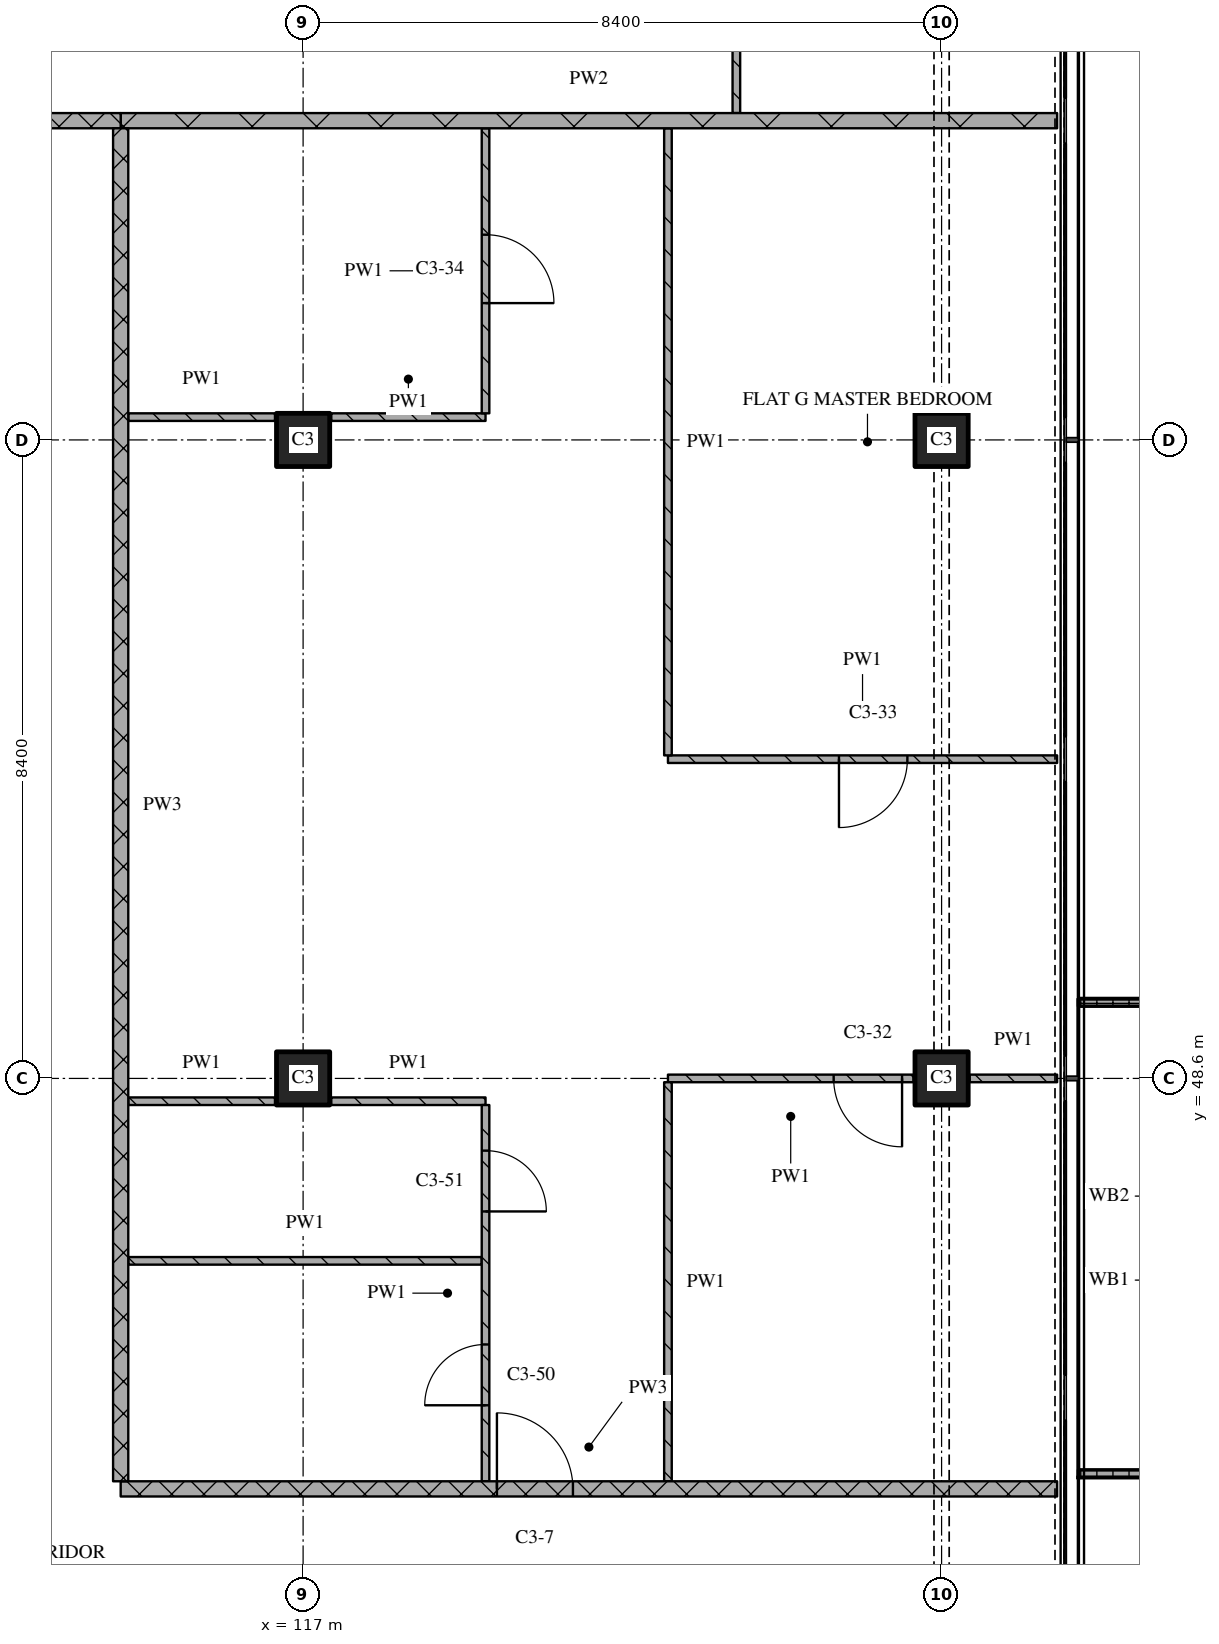
"""IFC4 building model, lengths in metres.
Left out: names, types, materials, properties, quantities, classifications, styles, units other than length and angle.
Written with IfcOpenShell. Run it as: python <this file> out.ifc"""

import sys

from ifc_helpers import new_model, si_unit, direction, frame, frame_2d, origin, origin_2d, place, context, subcontext, project, spatial, polyline, rectangle, outline, extrude, element, fill, save


model = new_model("IFC4")
c1 = context("Model", 3, precision=1e-05, world=origin(), true_north=direction((0.0, 1.0)))
c2 = subcontext(c1, "Body", "Model", "MODEL_VIEW")
j1 = project(units=[si_unit("LENGTHUNIT", "METRE"), si_unit("PLANEANGLEUNIT", "RADIAN")], contexts=[c1])
p1 = place(None, origin())
s1 = spatial("IfcSite", under=j1, at=p1, CompositionType="ELEMENT")
p2 = place(p1, origin())
s2 = spatial("IfcBuilding", under=s1, at=p2, CompositionType="ELEMENT")
p3 = place(p2, frame((0.0, 0.0, 169.05)))
s3 = spatial("IfcBuildingStorey", under=s2, at=p3, CompositionType="ELEMENT", Elevation=169.05)
for number, where, z_axis, x_axis in (
    (1, (117.0, 48.6, 0.0), (0.0, 0.0, 1.0), (1.0, 0.0, 0.0)),
    (2, (117.0, 57.0, 0.0), (0.0, 0.0, 1.0), (1.0, 0.0, 0.0)),
    (3, (125.4, 48.6, 0.0), (0.0, 0.0, 1.0), (1.0, 0.0, 0.0)),
    (4, (125.4, 57.0, 0.0), (0.0, 0.0, 1.0), (1.0, 0.0, 0.0)),
):
    element("IfcColumn", number, at=place(p3, frame(where, z_axis=z_axis, x_axis=x_axis)), inside=s3, PredefinedType="COLUMN", context=c2, shape_type="SweptSolid", body=[
        extrude(rectangle(XDim=0.7, YDim=0.7, at=origin_2d()), origin(), (0.0, 0.0, 1.0), 3.6),
    ])
p4 = place(p3, origin())
e5 = element("IfcWall", 5, at=p4, inside=s3, PredefinedType="SOLIDWALL", context=c2, shape_type="SweptSolid", body=[
    extrude(outline(polyline([(127.2, 43.35), (127.2, 43.45), (128.967, 43.45), (128.967, 49.55), (127.2, 49.55), (127.2, 49.65), (129.067, 49.65), (129.067, 43.35), (127.2, 43.35)])), origin(), (0.0, 0.0, 1.0), 1.0),
])
p5 = place(p3, frame((114.6, 43.2, 0.0), z_axis=(0.0, 0.0, 1.0), x_axis=(1.0, 0.0, 0.0)))
e6 = element("IfcWall", 6, at=p5, inside=s3, PredefinedType="PARTITIONING", context=c2, shape_type="SweptSolid", body=[
    extrude(rectangle(XDim=12.32, YDim=0.2, at=frame_2d((6.16, 0.0))), origin(), (0.0, 0.0, 1.0), 3.32),
])
p6 = place(p5, frame((4.95, 0.0, 0.0)))
e7 = element("IfcOpeningElement", 7, at=p6, cuts=e6, PredefinedType="OPENING", context=c2, shape_type="SweptSolid", body=[
    extrude(rectangle(XDim=1.0, YDim=2.1, at=frame_2d((0.5, 1.05))), frame((0.0, 0.11, 0.0), z_axis=(0.0, -1.0, 0.0), x_axis=(1.0, 0.0, 0.0)), (0.0, 0.0, 1.0), 0.22),
])
p7 = place(p3, frame((114.7, 46.2, 0.0), z_axis=(0.0, 0.0, 1.0), x_axis=(1.0, 0.0, 0.0)))
e8 = element("IfcWall", 8, at=p7, inside=s3, PredefinedType="PARTITIONING", context=c2, shape_type="SweptSolid", body=[
    extrude(rectangle(XDim=4.65, YDim=0.1, at=frame_2d((2.325, 0.0))), origin(), (0.0, 0.0, 1.0), 3.32),
])
p8 = place(p3, frame((114.7, 48.3, 0.0), z_axis=(0.0, 0.0, 1.0), x_axis=(1.0, 0.0, 0.0)))
e9 = element("IfcWall", 9, at=p8, inside=s3, PredefinedType="PARTITIONING", context=c2, shape_type="SweptSolid", body=[
    extrude(rectangle(XDim=1.93, YDim=0.1, at=frame_2d((0.965, 0.0))), origin(), (0.0, 0.0, 1.0), 3.32),
])
p9 = place(p3, frame((117.37, 48.3, 0.0), z_axis=(0.0, 0.0, 1.0), x_axis=(1.0, 0.0, 0.0)))
e10 = element("IfcWall", 10, at=p9, inside=s3, PredefinedType="PARTITIONING", context=c2, shape_type="SweptSolid", body=[
    extrude(rectangle(XDim=2.03, YDim=0.1, at=frame_2d((1.015, 0.0))), origin(), (0.0, 0.0, 1.0), 3.32),
])
p10 = place(p3, frame((125.03, 48.6, 0.0), z_axis=(0.0, 0.0, 1.0), x_axis=(-1.0, 0.0, 0.0)))
e11 = element("IfcWall", 11, at=p10, inside=s3, PredefinedType="PARTITIONING", context=c2, shape_type="SweptSolid", body=[
    extrude(rectangle(XDim=3.23, YDim=0.1, at=frame_2d((1.615, 0.0))), origin(), (0.0, 0.0, 1.0), 3.32),
])
p11 = place(p10, frame((0.15, 0.0, 0.0)))
e12 = element("IfcOpeningElement", 12, at=p11, cuts=e11, PredefinedType="OPENING", context=c2, shape_type="SweptSolid", body=[
    extrude(rectangle(XDim=0.9, YDim=2.1, at=frame_2d((0.45, 1.05))), frame((0.0, 0.06, 0.0), z_axis=(0.0, -1.0, 0.0), x_axis=(1.0, 0.0, 0.0)), (0.0, 0.0, 1.0), 0.12),
])
p12 = place(p3, frame((125.77, 48.6, 0.0), z_axis=(0.0, 0.0, 1.0), x_axis=(1.0, 0.0, 0.0)))
e13 = element("IfcWall", 13, at=p12, inside=s3, PredefinedType="PARTITIONING", context=c2, shape_type="SweptSolid", body=[
    extrude(rectangle(XDim=1.15, YDim=0.1, at=frame_2d((0.575, 0.0))), origin(), (0.0, 0.0, 1.0), 3.32),
])
p13 = place(p3, frame((121.8, 52.8, 0.0), z_axis=(0.0, 0.0, 1.0), x_axis=(1.0, 0.0, 0.0)))
e14 = element("IfcWall", 14, at=p13, inside=s3, PredefinedType="PARTITIONING", context=c2, shape_type="SweptSolid", body=[
    extrude(rectangle(XDim=5.12, YDim=0.1, at=frame_2d((2.56, 0.0))), origin(), (0.0, 0.0, 1.0), 3.32),
])
p14 = place(p13, frame((2.25, 0.0, 0.0)))
e15 = element("IfcOpeningElement", 15, at=p14, cuts=e14, PredefinedType="OPENING", context=c2, shape_type="SweptSolid", body=[
    extrude(rectangle(XDim=0.9, YDim=2.1, at=frame_2d((0.45, 1.05))), frame((0.0, 0.06, 0.0), z_axis=(0.0, -1.0, 0.0), x_axis=(1.0, 0.0, 0.0)), (0.0, 0.0, 1.0), 0.12),
])
p15 = place(p3, frame((114.7, 57.3, 0.0), z_axis=(0.0, 0.0, 1.0), x_axis=(1.0, 0.0, 0.0)))
e16 = element("IfcWall", 16, at=p15, inside=s3, PredefinedType="PARTITIONING", context=c2, shape_type="SweptSolid", body=[
    extrude(rectangle(XDim=1.93, YDim=0.1, at=frame_2d((0.965, 0.0))), origin(), (0.0, 0.0, 1.0), 3.32),
])
p16 = place(p3, frame((117.37, 57.3, 0.0), z_axis=(0.0, 0.0, 1.0), x_axis=(1.0, 0.0, 0.0)))
e17 = element("IfcWall", 17, at=p16, inside=s3, PredefinedType="PARTITIONING", context=c2, shape_type="SweptSolid", body=[
    extrude(rectangle(XDim=2.03, YDim=0.1, at=frame_2d((1.015, 0.0))), origin(), (0.0, 0.0, 1.0), 3.32),
])
p17 = place(p3, frame((111.0, 61.2, 0.0), z_axis=(0.0, 0.0, 1.0), x_axis=(1.0, 0.0, 0.0)))
e18 = element("IfcWall", 18, at=p17, inside=s3, PredefinedType="PARTITIONING", context=c2, shape_type="SweptSolid", body=[
    extrude(rectangle(XDim=3.6, YDim=0.2, at=frame_2d((1.8, 0.0))), origin(), (0.0, 0.0, 1.0), 3.32),
])
p18 = place(p3, frame((114.6, 61.2, 0.0), z_axis=(0.0, 0.0, 1.0), x_axis=(1.0, 0.0, 0.0)))
e19 = element("IfcWall", 19, at=p18, inside=s3, PredefinedType="PARTITIONING", context=c2, shape_type="SweptSolid", body=[
    extrude(rectangle(XDim=12.32, YDim=0.2, at=frame_2d((6.16, 0.0))), origin(), (0.0, 0.0, 1.0), 3.32),
])
p19 = place(p3, frame((114.6, 61.1, 0.0), z_axis=(0.0, 0.0, 1.0), x_axis=(0.0, -1.0, 0.0)))
e20 = element("IfcWall", 20, at=p19, inside=s3, PredefinedType="PARTITIONING", context=c2, shape_type="SweptSolid", body=[
    extrude(rectangle(XDim=17.8, YDim=0.2, at=frame_2d((8.9, 0.0))), origin(), (0.0, 0.0, 1.0), 3.32),
])
p20 = place(p3, frame((119.4, 43.3, 0.0), z_axis=(0.0, 0.0, 1.0), x_axis=(0.0, 1.0, 0.0)))
e21 = element("IfcWall", 21, at=p20, inside=s3, PredefinedType="PARTITIONING", context=c2, shape_type="SweptSolid", body=[
    extrude(rectangle(XDim=4.95, YDim=0.1, at=frame_2d((2.475, 0.0))), origin(), (0.0, 0.0, 1.0), 3.32),
])
p21 = place(p20, frame((1.0, 0.0, 0.0)))
e22 = element("IfcOpeningElement", 22, at=p21, cuts=e21, PredefinedType="OPENING", context=c2, shape_type="SweptSolid", body=[
    extrude(rectangle(XDim=0.8, YDim=2.1, at=frame_2d((0.4, 1.05))), frame((0.0, 0.06, 0.0), z_axis=(0.0, -1.0, 0.0), x_axis=(1.0, 0.0, 0.0)), (0.0, 0.0, 1.0), 0.12),
])
p22 = place(p20, frame((3.55, 0.0, 0.0)))
e23 = element("IfcOpeningElement", 23, at=p22, cuts=e21, PredefinedType="OPENING", context=c2, shape_type="SweptSolid", body=[
    extrude(rectangle(XDim=0.8, YDim=2.1, at=frame_2d((0.4, 1.05))), frame((0.0, 0.06, 0.0), z_axis=(0.0, -1.0, 0.0), x_axis=(1.0, 0.0, 0.0)), (0.0, 0.0, 1.0), 0.12),
])
p23 = place(p3, frame((119.4, 57.35, 0.0), z_axis=(0.0, 0.0, 1.0), x_axis=(0.0, 1.0, 0.0)))
e24 = element("IfcWall", 24, at=p23, inside=s3, PredefinedType="PARTITIONING", context=c2, shape_type="SweptSolid", body=[
    extrude(rectangle(XDim=3.75, YDim=0.1, at=frame_2d((1.875, 0.0))), origin(), (0.0, 0.0, 1.0), 3.32),
])
p24 = place(p23, frame((1.45, 0.0, 0.0)))
e25 = element("IfcOpeningElement", 25, at=p24, cuts=e24, PredefinedType="OPENING", context=c2, shape_type="SweptSolid", body=[
    extrude(rectangle(XDim=0.9, YDim=2.1, at=frame_2d((0.45, 1.05))), frame((0.0, 0.06, 0.0), z_axis=(0.0, -1.0, 0.0), x_axis=(1.0, 0.0, 0.0)), (0.0, 0.0, 1.0), 0.12),
])
p25 = place(p3, frame((121.8, 48.55, 0.0), z_axis=(0.0, 0.0, 1.0), x_axis=(0.0, -1.0, 0.0)))
e26 = element("IfcWall", 26, at=p25, inside=s3, PredefinedType="PARTITIONING", context=c2, shape_type="SweptSolid", body=[
    extrude(rectangle(XDim=5.25, YDim=0.1, at=frame_2d((2.625, 0.0))), origin(), (0.0, 0.0, 1.0), 3.32),
])
for number, where, z_axis, x_axis in (
    (27, (121.8, 61.1, 0.0), (0.0, 0.0, 1.0), (0.0, -1.0, 0.0)),
    (28, (122.7, 69.55, 0.0), (0.0, 0.0, 1.0), (0.0, -1.0, 0.0)),
):
    element("IfcWall", number, at=place(p3, frame(where, z_axis=z_axis, x_axis=x_axis)), inside=s3, PredefinedType="PARTITIONING", context=c2, shape_type="SweptSolid", body=[
        extrude(rectangle(XDim=8.25, YDim=0.1, at=frame_2d((4.125, 0.0))), origin(), (0.0, 0.0, 1.0), 3.32),
    ])
p26 = place(p6, origin())
e29 = element("IfcDoor", 29, at=p26, inside=s3, OperationType="SINGLE_SWING_LEFT", PredefinedType="DOOR", context=c2, shape_type="SweptSolid", body=[
    extrude(rectangle(XDim=1.0, YDim=2.1, at=frame_2d((0.5, 1.05))), frame((0.0, 0.025, 0.0), z_axis=(0.0, -1.0, 0.0), x_axis=(1.0, 0.0, 0.0)), (0.0, 0.0, 1.0), 0.05),
])
fill(e7, e29)
p27 = place(p11, origin())
e30 = element("IfcDoor", 30, at=p27, inside=s3, OperationType="SINGLE_SWING_LEFT", PredefinedType="DOOR", context=c2, shape_type="SweptSolid", body=[
    extrude(rectangle(XDim=0.9, YDim=2.1, at=frame_2d((0.45, 1.05))), frame((0.0, 0.025, 0.0), z_axis=(0.0, -1.0, 0.0), x_axis=(1.0, 0.0, 0.0)), (0.0, 0.0, 1.0), 0.05),
])
fill(e12, e30)
p28 = place(p14, origin())
e31 = element("IfcDoor", 31, at=p28, inside=s3, OperationType="SINGLE_SWING_RIGHT", PredefinedType="DOOR", context=c2, shape_type="SweptSolid", body=[
    extrude(rectangle(XDim=0.9, YDim=2.1, at=frame_2d((0.45, 1.05))), frame((0.0, 0.025, 0.0), z_axis=(0.0, -1.0, 0.0), x_axis=(1.0, 0.0, 0.0)), (0.0, 0.0, 1.0), 0.05),
])
fill(e15, e31)
p29 = place(p21, origin())
e32 = element("IfcDoor", 32, at=p29, inside=s3, OperationType="SINGLE_SWING_LEFT", PredefinedType="DOOR", context=c2, shape_type="SweptSolid", body=[
    extrude(rectangle(XDim=0.8, YDim=2.1, at=frame_2d((0.4, 1.05))), frame((0.0, 0.025, 0.0), z_axis=(0.0, -1.0, 0.0), x_axis=(1.0, 0.0, 0.0)), (0.0, 0.0, 1.0), 0.05),
])
fill(e22, e32)
p30 = place(p22, origin())
e33 = element("IfcDoor", 33, at=p30, inside=s3, OperationType="SINGLE_SWING_RIGHT", PredefinedType="DOOR", context=c2, shape_type="SweptSolid", body=[
    extrude(rectangle(XDim=0.8, YDim=2.1, at=frame_2d((0.4, 1.05))), frame((0.0, 0.025, 0.0), z_axis=(0.0, -1.0, 0.0), x_axis=(1.0, 0.0, 0.0)), (0.0, 0.0, 1.0), 0.05),
])
fill(e23, e33)
p31 = place(p24, origin())
e34 = element("IfcDoor", 34, at=p31, inside=s3, OperationType="SINGLE_SWING_RIGHT", PredefinedType="DOOR", context=c2, shape_type="SweptSolid", body=[
    extrude(rectangle(XDim=0.9, YDim=2.1, at=frame_2d((0.45, 1.05))), frame((0.0, 0.025, 0.0), z_axis=(0.0, -1.0, 0.0), x_axis=(1.0, 0.0, 0.0)), (0.0, 0.0, 1.0), 0.05),
])
fill(e25, e34)
save(model, sys.argv[1])
